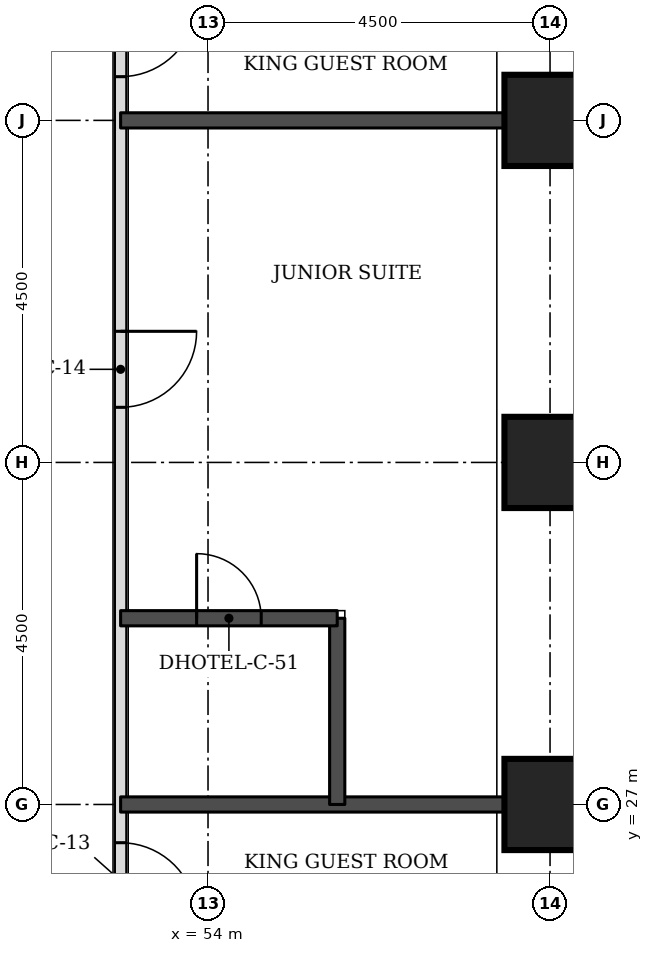
"""IFC4 building model, lengths in metres.
Left out: names, types, materials, properties, quantities, classifications, styles, units other than length and angle.
Written with IfcOpenShell. Run it as: python <this file> out.ifc"""

import sys

from ifc_helpers import new_model, si_unit, direction, frame, frame_2d, origin, origin_2d, place, context, subcontext, project, spatial, rectangle, extrude, element, fill, save


model = new_model("IFC4")
c1 = context("Model", 3, precision=1e-05, world=origin(), true_north=direction((0.0, 1.0)))
c2 = subcontext(c1, "Body", "Model", "MODEL_VIEW")
j1 = project(units=[si_unit("LENGTHUNIT", "METRE"), si_unit("PLANEANGLEUNIT", "RADIAN")], contexts=[c1])
p1 = place(None, origin())
s1 = spatial("IfcSite", under=j1, at=p1, CompositionType="ELEMENT")
p2 = place(p1, origin())
s2 = spatial("IfcBuilding", under=s1, at=p2, CompositionType="ELEMENT")
p3 = place(p2, frame((0.0, 0.0, 56.1)))
s3 = spatial("IfcBuildingStorey", under=s2, at=p3, CompositionType="ELEMENT", Elevation=56.1)
for number, where, z_axis, x_axis in (
    (1, (58.5, 27.0, 0.0), (0.0, 0.0, 1.0), (1.0, 0.0, 0.0)),
    (2, (58.5, 31.5, 0.0), (0.0, 0.0, 1.0), (1.0, 0.0, 0.0)),
    (3, (58.5, 36.0, 0.0), (0.0, 0.0, 1.0), (1.0, 0.0, 0.0)),
):
    element("IfcColumn", number, at=place(p3, frame(where, z_axis=z_axis, x_axis=x_axis)), inside=s3, PredefinedType="COLUMN", context=c2, shape_type="SweptSolid", body=[
        extrude(rectangle(XDim=1.2, YDim=1.2, at=origin_2d()), origin(), (0.0, 0.0, 1.0), 3.3),
    ])
p4 = place(p3, frame((52.85, 25.15, 0.0), z_axis=(0.0, 0.0, 1.0), x_axis=(0.0, 1.0, 0.0)))
e4 = element("IfcWall", 4, at=p4, inside=s3, PredefinedType="PARTITIONING", context=c2, shape_type="SweptSolid", body=[
    extrude(rectangle(XDim=22.35, YDim=0.15, at=frame_2d((11.175, 0.0))), origin(), (0.0, 0.0, 1.0), 3.08),
])
p5 = place(p4, frame((0.347, 0.0, 0.0)))
e5 = element("IfcOpeningElement", 5, at=p5, cuts=e4, PredefinedType="OPENING", context=c2, shape_type="SweptSolid", body=[
    extrude(rectangle(XDim=1.0, YDim=2.1, at=frame_2d((0.5, 1.05))), frame((0.0, 0.085, 0.0), z_axis=(0.0, -1.0, 0.0), x_axis=(1.0, 0.0, 0.0)), (0.0, 0.0, 1.0), 0.17),
])
p6 = place(p4, frame((7.075, 0.0, 0.0)))
e6 = element("IfcOpeningElement", 6, at=p6, cuts=e4, PredefinedType="OPENING", context=c2, shape_type="SweptSolid", body=[
    extrude(rectangle(XDim=1.0, YDim=2.1, at=frame_2d((0.5, 1.05))), frame((0.0, 0.085, 0.0), z_axis=(0.0, -1.0, 0.0), x_axis=(1.0, 0.0, 0.0)), (0.0, 0.0, 1.0), 0.17),
])
p7 = place(p4, frame((11.425, 0.0, 0.0)))
e7 = element("IfcOpeningElement", 7, at=p7, cuts=e4, PredefinedType="OPENING", context=c2, shape_type="SweptSolid", body=[
    extrude(rectangle(XDim=1.0, YDim=2.1, at=frame_2d((0.5, 1.05))), frame((0.0, 0.085, 0.0), z_axis=(0.0, -1.0, 0.0), x_axis=(1.0, 0.0, 0.0)), (0.0, 0.0, 1.0), 0.17),
])
p8 = place(p4, frame((17.15, 0.0, 0.0)))
e8 = element("IfcOpeningElement", 8, at=p8, cuts=e4, PredefinedType="OPENING", context=c2, shape_type="SweptSolid", body=[
    extrude(rectangle(XDim=0.9, YDim=2.1, at=frame_2d((0.45, 1.05))), frame((0.0, 0.085, 0.0), z_axis=(0.0, -1.0, 0.0), x_axis=(1.0, 0.0, 0.0)), (0.0, 0.0, 1.0), 0.17),
])
p9 = place(p3, frame((52.85, 27.0, 0.0), z_axis=(0.0, 0.0, 1.0), x_axis=(1.0, 0.0, 0.0)))
e9 = element("IfcWall", 9, at=p9, inside=s3, PredefinedType="SOLIDWALL", context=c2, shape_type="SweptSolid", body=[
    extrude(rectangle(XDim=5.05, YDim=0.2, at=frame_2d((2.525, 0.0))), origin(), (0.0, 0.0, 1.0), 3.08),
])
p10 = place(p3, frame((55.7, 27.0, 0.0), z_axis=(0.0, 0.0, 1.0), x_axis=(0.0, 1.0, 0.0)))
e10 = element("IfcWall", 10, at=p10, inside=s3, PredefinedType="SOLIDWALL", context=c2, shape_type="SweptSolid", body=[
    extrude(rectangle(XDim=2.45, YDim=0.2, at=frame_2d((1.225, 0.0))), origin(), (0.0, 0.0, 1.0), 3.08),
])
p11 = place(p3, frame((52.85, 29.45, 0.0), z_axis=(0.0, 0.0, 1.0), x_axis=(1.0, 0.0, 0.0)))
e11 = element("IfcWall", 11, at=p11, inside=s3, PredefinedType="SOLIDWALL", context=c2, shape_type="SweptSolid", body=[
    extrude(rectangle(XDim=2.85, YDim=0.2, at=frame_2d((1.425, 0.0))), origin(), (0.0, 0.0, 1.0), 3.08),
])
p12 = place(p11, frame((1.0, 0.0, 0.0)))
e12 = element("IfcOpeningElement", 12, at=p12, cuts=e11, PredefinedType="OPENING", context=c2, shape_type="SweptSolid", body=[
    extrude(rectangle(XDim=0.85, YDim=2.1, at=frame_2d((0.425, 1.05))), frame((0.0, 0.11, 0.0), z_axis=(0.0, -1.0, 0.0), x_axis=(1.0, 0.0, 0.0)), (0.0, 0.0, 1.0), 0.22),
])
p13 = place(p3, frame((52.85, 36.0, 0.0), z_axis=(0.0, 0.0, 1.0), x_axis=(1.0, 0.0, 0.0)))
e13 = element("IfcWall", 13, at=p13, inside=s3, PredefinedType="SOLIDWALL", context=c2, shape_type="SweptSolid", body=[
    extrude(rectangle(XDim=5.05, YDim=0.2, at=frame_2d((2.525, 0.0))), origin(), (0.0, 0.0, 1.0), 3.08),
])
p14 = place(p5, frame((1.0, 0.0, 0.0), z_axis=(0.0, 0.0, 1.0), x_axis=(-1.0, 0.0, 0.0)))
e14 = element("IfcDoor", 14, at=p14, inside=s3, OperationType="SINGLE_SWING_RIGHT", PredefinedType="DOOR", context=c2, shape_type="SweptSolid", body=[
    extrude(rectangle(XDim=1.0, YDim=2.1, at=frame_2d((0.5, 1.05))), frame((0.0, 0.025, 0.0), z_axis=(0.0, -1.0, 0.0), x_axis=(1.0, 0.0, 0.0)), (0.0, 0.0, 1.0), 0.05),
])
fill(e5, e14)
p15 = place(p6, frame((1.0, 0.0, 0.0), z_axis=(0.0, 0.0, 1.0), x_axis=(-1.0, 0.0, 0.0)))
e15 = element("IfcDoor", 15, at=p15, inside=s3, OperationType="SINGLE_SWING_LEFT", PredefinedType="DOOR", context=c2, shape_type="SweptSolid", body=[
    extrude(rectangle(XDim=1.0, YDim=2.1, at=frame_2d((0.5, 1.05))), frame((0.0, 0.025, 0.0), z_axis=(0.0, -1.0, 0.0), x_axis=(1.0, 0.0, 0.0)), (0.0, 0.0, 1.0), 0.05),
])
fill(e6, e15)
p16 = place(p12, origin())
e16 = element("IfcDoor", 16, at=p16, inside=s3, OperationType="SINGLE_SWING_LEFT", PredefinedType="DOOR", context=c2, shape_type="SweptSolid", body=[
    extrude(rectangle(XDim=0.85, YDim=2.1, at=frame_2d((0.425, 1.05))), frame((0.0, 0.025, 0.0), z_axis=(0.0, -1.0, 0.0), x_axis=(1.0, 0.0, 0.0)), (0.0, 0.0, 1.0), 0.05),
])
fill(e12, e16)
p17 = place(p7, frame((1.0, 0.0, 0.0), z_axis=(0.0, 0.0, 1.0), x_axis=(-1.0, 0.0, 0.0)))
e17 = element("IfcDoor", 17, at=p17, inside=s3, OperationType="SINGLE_SWING_LEFT", PredefinedType="DOOR", context=c2, shape_type="SweptSolid", body=[
    extrude(rectangle(XDim=1.0, YDim=2.1, at=frame_2d((0.5, 1.05))), frame((0.0, 0.025, 0.0), z_axis=(0.0, -1.0, 0.0), x_axis=(1.0, 0.0, 0.0)), (0.0, 0.0, 1.0), 0.05),
])
fill(e7, e17)
save(model, sys.argv[1])
